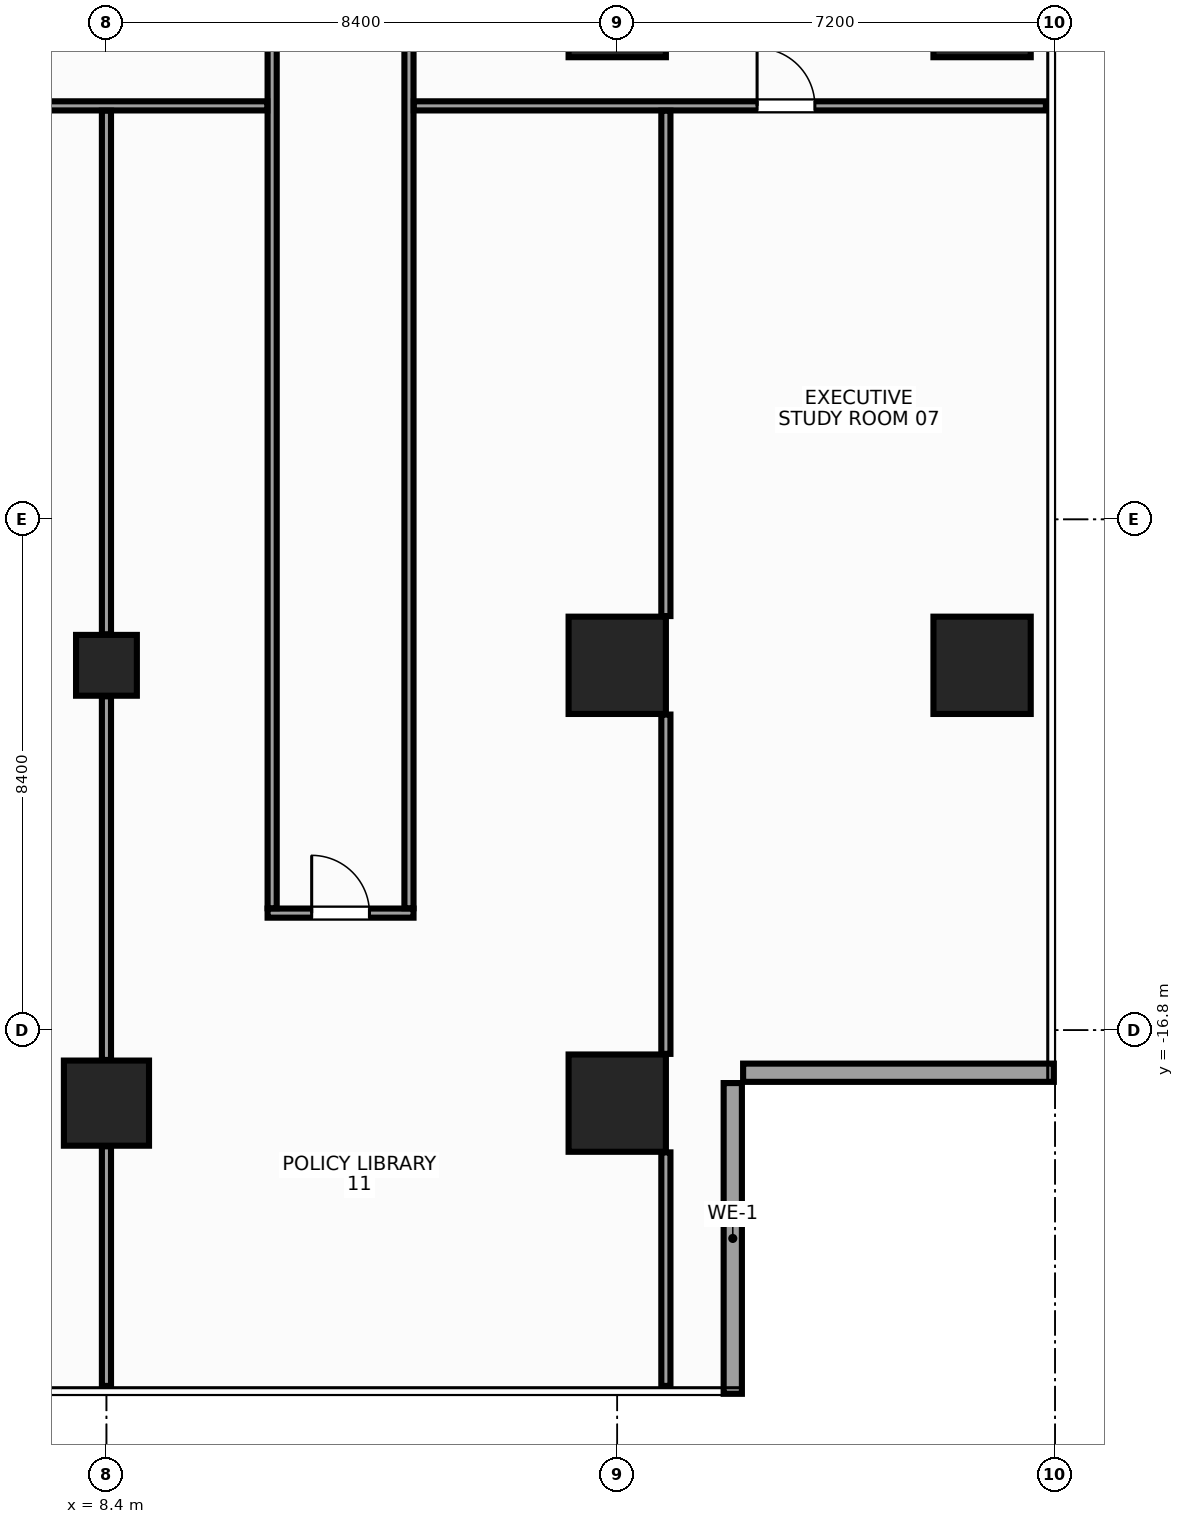
"""IFC4 building model, lengths in metres.
Left out: names, types, materials, properties, quantities, classifications, styles, units other than length and angle.
Written with IfcOpenShell. Run it as: python <this file> out.ifc"""

import sys

from ifc_helpers import new_model, si_unit, direction, frame, frame_2d, origin, origin_2d, place, context, subcontext, project, spatial, rectangle, hollow_rectangle, extrude, source, transform, mapped, element, fill, save


model = new_model("IFC4")
c1 = context("Model", 3, precision=1e-05, world=origin(), true_north=direction((0.0, 1.0)))
c2 = subcontext(c1, "Body", "Model", "MODEL_VIEW")
j1 = project(units=[si_unit("LENGTHUNIT", "METRE"), si_unit("PLANEANGLEUNIT", "RADIAN")], contexts=[c1])
p1 = place(None, origin())
s1 = spatial("IfcSite", under=j1, at=p1, CompositionType="ELEMENT")
p2 = place(p1, origin())
s2 = spatial("IfcBuilding", under=s1, at=p2, CompositionType="ELEMENT")
p3 = place(p2, frame((0.0, 0.0, 149.6)))
s3 = spatial("IfcBuildingStorey", under=s2, at=p3, CompositionType="ELEMENT", Elevation=149.6)
m1 = source(origin(), c2, "Body", "SweptSolid", [
    extrude(rectangle(XDim=1.6, YDim=1.6, at=origin_2d()), origin(), (0.0, 0.0, 1.0), 3.6),
])
for number, where, z_axis, x_axis in (
    (1, (16.8, -18.0, 0.0), (0.0, 0.0, 1.0), (1.0, 0.0, 0.0)),
    (2, (16.8, -10.8, 0.0), (0.0, 0.0, 1.0), (1.0, 0.0, 0.0)),
    (3, (16.8, 0.0, 0.0), (0.0, 0.0, 1.0), (1.0, 0.0, 0.0)),
    (4, (22.8, -10.8, 0.0), (0.0, 0.0, 1.0), (1.0, 0.0, 0.0)),
    (5, (22.8, 0.0, 0.0), (0.0, 0.0, 1.0), (1.0, 0.0, 0.0)),
):
    element("IfcColumn", number, at=place(p3, frame(where, z_axis=z_axis, x_axis=x_axis)), inside=s3, PredefinedType="COLUMN", context=c2, shape_type="MappedRepresentation", body=[
        mapped(m1, transform((0.0, 0.0, 0.0), x_axis=(1.0, 0.0, 0.0), y_axis=(0.0, 1.0, 0.0), z_axis=(0.0, 0.0, 1.0), scale=1.0)),
    ])
m2 = source(origin(), c2, "Body", "SweptSolid", [
    extrude(rectangle(XDim=1.4, YDim=1.4, at=origin_2d()), origin(), (0.0, 0.0, 1.0), 3.6),
])
p4 = place(p3, frame((8.4, -18.0, 0.0), z_axis=(0.0, 0.0, 1.0), x_axis=(1.0, 0.0, 0.0)))
e6 = element("IfcColumn", 6, at=p4, inside=s3, PredefinedType="COLUMN", context=c2, shape_type="MappedRepresentation", body=[
    mapped(m2, transform((0.0, 0.0, 0.0), x_axis=(1.0, 0.0, 0.0), y_axis=(0.0, 1.0, 0.0), z_axis=(0.0, 0.0, 1.0), scale=1.0)),
])
m3 = source(origin(), c2, "Body", "SweptSolid", [
    extrude(hollow_rectangle(XDim=1.0, YDim=1.0, WallThickness=0.045, at=origin_2d()), origin(), (0.0, 0.0, 1.0), 3.6),
])
p5 = place(p3, frame((8.4, -10.8, 0.0), z_axis=(0.0, 0.0, 1.0), x_axis=(1.0, 0.0, 0.0)))
e7 = element("IfcColumn", 7, at=p5, inside=s3, PredefinedType="COLUMN", context=c2, shape_type="MappedRepresentation", body=[
    mapped(m3, transform((0.0, 0.0, 0.0), x_axis=(1.0, 0.0, 0.0), y_axis=(0.0, 1.0, 0.0), z_axis=(0.0, 0.0, 1.0), scale=1.0)),
])
m4 = source(origin(), c2, "Body", "SweptSolid", [
    extrude(rectangle(XDim=5.11, YDim=0.3, at=frame_2d((2.555, 0.0))), origin(), (0.0, 0.0, 1.0), 2.76),
])
p6 = place(p3, frame((18.7, -22.78, 0.0), z_axis=(0.0, 0.0, 1.0), x_axis=(0.0, 1.0, 0.0)))
e8 = element("IfcWall", 8, at=p6, inside=s3, PredefinedType="STANDARD", context=c2, shape_type="MappedRepresentation", body=[
    mapped(m4, transform((0.0, 0.0, 0.0), x_axis=(1.0, 0.0, 0.0), y_axis=(0.0, 1.0, 0.0), z_axis=(0.0, 0.0, 1.0), scale=1.0)),
])
m5 = source(origin(), c2, "Body", "SweptSolid", [
    extrude(rectangle(XDim=5.11, YDim=0.3, at=frame_2d((2.555, 0.0))), origin(), (0.0, 0.0, 1.0), 2.76),
])
p7 = place(p3, frame((18.87, -17.5, 0.0), z_axis=(0.0, 0.0, 1.0), x_axis=(1.0, 0.0, 0.0)))
e9 = element("IfcWall", 9, at=p7, inside=s3, PredefinedType="STANDARD", context=c2, shape_type="MappedRepresentation", body=[
    mapped(m5, transform((0.0, 0.0, 0.0), x_axis=(1.0, 0.0, 0.0), y_axis=(0.0, 1.0, 0.0), z_axis=(0.0, 0.0, 1.0), scale=1.0)),
])
m6 = source(origin(), c2, "Body", "SweptSolid", [
    extrude(rectangle(XDim=2.4, YDim=0.15, at=frame_2d((1.2, 0.0))), origin(), (0.0, 0.0, 1.0), 3.38),
])
p8 = place(p3, frame((11.05, -14.875, 0.0), z_axis=(0.0, 0.0, 1.0), x_axis=(1.0, 0.0, 0.0)))
e10 = element("IfcWall", 10, at=p8, inside=s3, PredefinedType="PARTITIONING", context=c2, shape_type="MappedRepresentation", body=[
    mapped(m6, transform((0.0, 0.0, 0.0), x_axis=(1.0, 0.0, 0.0), y_axis=(0.0, 1.0, 0.0), z_axis=(0.0, 0.0, 1.0), scale=1.0)),
])
p9 = place(p8, frame((0.725, 0.0, 0.0)))
e11 = element("IfcOpeningElement", 11, at=p9, cuts=e10, PredefinedType="OPENING", context=c2, shape_type="SweptSolid", body=[
    extrude(rectangle(XDim=0.95, YDim=2.15, at=frame_2d((0.475, 1.075))), frame((0.0, 0.087, 0.0), z_axis=(0.0, -1.0, 0.0), x_axis=(1.0, 0.0, 0.0)), (0.0, 0.0, 1.0), 0.174),
])
m7 = source(origin(), c2, "Body", "SweptSolid", [
    extrude(rectangle(XDim=22.595, YDim=0.15, at=frame_2d((11.297, 0.0))), origin(), (0.0, 0.0, 1.0), 2.665),
])
for number, where, z_axis, x_axis in (
    (12, (11.125, -14.795, 0.0), (0.0, 0.0, 1.0), (0.0, 1.0, 0.0)),
    (13, (13.375, -14.795, 0.0), (0.0, 0.0, 1.0), (0.0, 1.0, 0.0)),
):
    element("IfcWall", number, at=place(p3, frame(where, z_axis=z_axis, x_axis=x_axis)), inside=s3, PredefinedType="PARTITIONING", context=c2, shape_type="MappedRepresentation", body=[
        mapped(m7, transform((0.0, 0.0, 0.0), x_axis=(1.0, 0.0, 0.0), y_axis=(0.0, 1.0, 0.0), z_axis=(0.0, 0.0, 1.0), scale=1.0)),
    ])
m8 = source(origin(), c2, "Body", "SweptSolid", [
    extrude(rectangle(XDim=34.895, YDim=0.15, at=frame_2d((17.448, 0.0))), origin(), (0.0, 0.0, 1.0), 2.765),
])
p10 = place(p3, frame((-23.85, -1.6, 0.0), z_axis=(0.0, 0.0, 1.0), x_axis=(1.0, 0.0, 0.0)))
e14 = element("IfcWall", 14, at=p10, inside=s3, PredefinedType="PARTITIONING", context=c2, shape_type="MappedRepresentation", body=[
    mapped(m8, transform((0.0, 0.0, 0.0), x_axis=(1.0, 0.0, 0.0), y_axis=(0.0, 1.0, 0.0), z_axis=(0.0, 0.0, 1.0), scale=1.0)),
])
p11 = place(p10, frame((3.913, 0.0, 0.0)))
e15 = element("IfcOpeningElement", 15, at=p11, cuts=e14, PredefinedType="OPENING", context=c2, shape_type="SweptSolid", body=[
    extrude(rectangle(XDim=0.95, YDim=2.15, at=frame_2d((0.475, 1.075))), frame((0.0, 0.087, 0.0), z_axis=(0.0, -1.0, 0.0), x_axis=(1.0, 0.0, 0.0)), (0.0, 0.0, 1.0), 0.174),
])
p12 = place(p10, frame((9.675, 0.0, 0.0)))
e16 = element("IfcOpeningElement", 16, at=p12, cuts=e14, PredefinedType="OPENING", context=c2, shape_type="SweptSolid", body=[
    extrude(rectangle(XDim=0.95, YDim=2.15, at=frame_2d((0.475, 1.075))), frame((0.0, 0.087, 0.0), z_axis=(0.0, -1.0, 0.0), x_axis=(1.0, 0.0, 0.0)), (0.0, 0.0, 1.0), 0.174),
])
p13 = place(p10, frame((19.175, 0.0, 0.0)))
e17 = element("IfcOpeningElement", 17, at=p13, cuts=e14, PredefinedType="OPENING", context=c2, shape_type="SweptSolid", body=[
    extrude(rectangle(XDim=0.95, YDim=2.15, at=frame_2d((0.475, 1.075))), frame((0.0, 0.087, 0.0), z_axis=(0.0, -1.0, 0.0), x_axis=(1.0, 0.0, 0.0)), (0.0, 0.0, 1.0), 0.174),
])
p14 = place(p10, frame((28.275, 0.0, 0.0)))
e18 = element("IfcOpeningElement", 18, at=p14, cuts=e14, PredefinedType="OPENING", context=c2, shape_type="SweptSolid", body=[
    extrude(rectangle(XDim=0.95, YDim=2.15, at=frame_2d((0.475, 1.075))), frame((0.0, 0.087, 0.0), z_axis=(0.0, -1.0, 0.0), x_axis=(1.0, 0.0, 0.0)), (0.0, 0.0, 1.0), 0.174),
])
m9 = source(origin(), c2, "Body", "SweptSolid", [
    extrude(rectangle(XDim=10.395, YDim=0.15, at=frame_2d((5.198, 0.0))), origin(), (0.0, 0.0, 1.0), 2.765),
])
p15 = place(p3, frame((13.455, -1.6, 0.0), z_axis=(0.0, 0.0, 1.0), x_axis=(1.0, 0.0, 0.0)))
e19 = element("IfcWall", 19, at=p15, inside=s3, PredefinedType="PARTITIONING", context=c2, shape_type="MappedRepresentation", body=[
    mapped(m9, transform((0.0, 0.0, 0.0), x_axis=(1.0, 0.0, 0.0), y_axis=(0.0, 1.0, 0.0), z_axis=(0.0, 0.0, 1.0), scale=1.0)),
])
p16 = place(p15, frame((5.645, 0.0, 0.0)))
e20 = element("IfcOpeningElement", 20, at=p16, cuts=e19, PredefinedType="OPENING", context=c2, shape_type="SweptSolid", body=[
    extrude(rectangle(XDim=0.95, YDim=2.15, at=frame_2d((0.475, 1.075))), frame((0.0, 0.087, 0.0), z_axis=(0.0, -1.0, 0.0), x_axis=(1.0, 0.0, 0.0)), (0.0, 0.0, 1.0), 0.174),
])
m10 = source(origin(), c2, "Body", "SweptSolid", [
    extrude(rectangle(XDim=3.94, YDim=0.15, at=frame_2d((1.97, 0.0))), origin(), (0.0, 0.0, 1.0), 3.38),
])
p17 = place(p3, frame((8.4, -22.65, 0.0), z_axis=(0.0, 0.0, 1.0), x_axis=(0.0, 1.0, 0.0)))
e21 = element("IfcWall", 21, at=p17, inside=s3, PredefinedType="PARTITIONING", context=c2, shape_type="MappedRepresentation", body=[
    mapped(m10, transform((0.0, 0.0, 0.0), x_axis=(1.0, 0.0, 0.0), y_axis=(0.0, 1.0, 0.0), z_axis=(0.0, 0.0, 1.0), scale=1.0)),
])
m11 = source(origin(), c2, "Body", "SweptSolid", [
    extrude(rectangle(XDim=5.98, YDim=0.15, at=frame_2d((2.99, 0.0))), origin(), (0.0, 0.0, 1.0), 2.965),
])
p18 = place(p3, frame((8.4, -17.29, 0.0), z_axis=(0.0, 0.0, 1.0), x_axis=(0.0, 1.0, 0.0)))
e22 = element("IfcWall", 22, at=p18, inside=s3, PredefinedType="PARTITIONING", context=c2, shape_type="MappedRepresentation", body=[
    mapped(m11, transform((0.0, 0.0, 0.0), x_axis=(1.0, 0.0, 0.0), y_axis=(0.0, 1.0, 0.0), z_axis=(0.0, 0.0, 1.0), scale=1.0)),
])
m12 = source(origin(), c2, "Body", "SweptSolid", [
    extrude(rectangle(XDim=8.61, YDim=0.15, at=frame_2d((4.305, 0.0))), origin(), (0.0, 0.0, 1.0), 2.765),
])
p19 = place(p3, frame((8.4, -10.29, 0.0), z_axis=(0.0, 0.0, 1.0), x_axis=(0.0, 1.0, 0.0)))
e23 = element("IfcWall", 23, at=p19, inside=s3, PredefinedType="PARTITIONING", context=c2, shape_type="MappedRepresentation", body=[
    mapped(m12, transform((0.0, 0.0, 0.0), x_axis=(1.0, 0.0, 0.0), y_axis=(0.0, 1.0, 0.0), z_axis=(0.0, 0.0, 1.0), scale=1.0)),
])
m13 = source(origin(), c2, "Body", "SweptSolid", [
    extrude(rectangle(XDim=3.84, YDim=0.15, at=frame_2d((1.92, 0.0))), origin(), (0.0, 0.0, 1.0), 3.38),
])
p20 = place(p3, frame((17.6, -22.65, 0.0), z_axis=(0.0, 0.0, 1.0), x_axis=(0.0, 1.0, 0.0)))
e24 = element("IfcWall", 24, at=p20, inside=s3, PredefinedType="PARTITIONING", context=c2, shape_type="MappedRepresentation", body=[
    mapped(m13, transform((0.0, 0.0, 0.0), x_axis=(1.0, 0.0, 0.0), y_axis=(0.0, 1.0, 0.0), z_axis=(0.0, 0.0, 1.0), scale=1.0)),
])
m14 = source(origin(), c2, "Body", "SweptSolid", [
    extrude(rectangle(XDim=5.58, YDim=0.15, at=frame_2d((2.79, 0.0))), origin(), (0.0, 0.0, 1.0), 3.38),
])
p21 = place(p3, frame((17.6, -17.19, 0.0), z_axis=(0.0, 0.0, 1.0), x_axis=(0.0, 1.0, 0.0)))
e25 = element("IfcWall", 25, at=p21, inside=s3, PredefinedType="PARTITIONING", context=c2, shape_type="MappedRepresentation", body=[
    mapped(m14, transform((0.0, 0.0, 0.0), x_axis=(1.0, 0.0, 0.0), y_axis=(0.0, 1.0, 0.0), z_axis=(0.0, 0.0, 1.0), scale=1.0)),
])
m15 = source(origin(), c2, "Body", "SweptSolid", [
    extrude(rectangle(XDim=8.31, YDim=0.15, at=frame_2d((4.155, 0.0))), origin(), (0.0, 0.0, 1.0), 3.38),
])
p22 = place(p3, frame((17.6, -9.99, 0.0), z_axis=(0.0, 0.0, 1.0), x_axis=(0.0, 1.0, 0.0)))
e26 = element("IfcWall", 26, at=p22, inside=s3, PredefinedType="PARTITIONING", context=c2, shape_type="MappedRepresentation", body=[
    mapped(m15, transform((0.0, 0.0, 0.0), x_axis=(1.0, 0.0, 0.0), y_axis=(0.0, 1.0, 0.0), z_axis=(0.0, 0.0, 1.0), scale=1.0)),
])
m16 = source(origin(), c2, "Body", "SweptSolid", [
    extrude(rectangle(XDim=0.95, YDim=2.15, at=frame_2d((0.475, 1.075))), frame((0.0, 0.025, 0.0), z_axis=(0.0, -1.0, 0.0), x_axis=(1.0, 0.0, 0.0)), (0.0, 0.0, 1.0), 0.05),
])
p23 = place(p9, origin())
e27 = element("IfcDoor", 27, at=p23, inside=s3, OperationType="SINGLE_SWING_LEFT", PredefinedType="DOOR", context=c2, shape_type="MappedRepresentation", body=[
    mapped(m16, transform((0.0, 0.0, 0.0), x_axis=(1.0, 0.0, 0.0), y_axis=(0.0, 1.0, 0.0), z_axis=(0.0, 0.0, 1.0), scale=1.0)),
])
fill(e11, e27)
p24 = place(p16, origin())
e28 = element("IfcDoor", 28, at=p24, inside=s3, OperationType="SINGLE_SWING_LEFT", PredefinedType="DOOR", context=c2, shape_type="MappedRepresentation", body=[
    mapped(m16, transform((0.0, 0.0, 0.0), x_axis=(1.0, 0.0, 0.0), y_axis=(0.0, 1.0, 0.0), z_axis=(0.0, 0.0, 1.0), scale=1.0)),
])
fill(e20, e28)
save(model, sys.argv[1])
